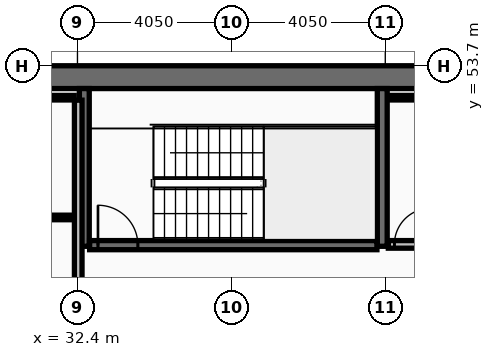
"""IFC4 building model, lengths in metres.
Left out: names, types, materials, properties, quantities, classifications, styles, units other than length and angle.
Written with IfcOpenShell. Run it as: python <this file> out.ifc"""

import sys

from ifc_helpers import new_model, si_unit, direction, frame, frame_2d, origin, place, context, subcontext, project, spatial, rectangle, extrude, element, fill, save


model = new_model("IFC4")
c1 = context("Model", 3, precision=1e-05, world=origin(), true_north=direction((0.0, 1.0)))
c2 = subcontext(c1, "Body", "Model", "MODEL_VIEW")
j1 = project(units=[si_unit("LENGTHUNIT", "METRE"), si_unit("PLANEANGLEUNIT", "RADIAN")], contexts=[c1])
p1 = place(None, origin())
s1 = spatial("IfcSite", under=j1, at=p1, CompositionType="ELEMENT")
p2 = place(p1, origin())
s2 = spatial("IfcBuilding", under=s1, at=p2, CompositionType="ELEMENT")
p3 = place(p2, frame((0.0, 0.0, 239.0)))
s3 = spatial("IfcBuildingStorey", under=s2, at=p3, CompositionType="ELEMENT", Elevation=239.0)
p4 = place(p3, frame((16.2, 53.4, 0.0), z_axis=(0.0, 0.0, 1.0), x_axis=(1.0, 0.0, 0.0)))
e1 = element("IfcWall", 1, at=p4, inside=s3, PredefinedType="SHEAR", context=c2, shape_type="SweptSolid", body=[
    extrude(rectangle(XDim=40.5, YDim=0.6, at=frame_2d((20.25, 0.0))), origin(), (0.0, 0.0, 1.0), 3.44),
])
for number, where, z_axis, x_axis in (
    (2, (32.58, 48.95, 0.0), (0.0, 0.0, 1.0), (0.0, 1.0, 0.0)),
    (3, (40.42, 48.95, 0.0), (0.0, 0.0, 1.0), (0.0, 1.0, 0.0)),
):
    element("IfcWall", number, at=place(p3, frame(where, z_axis=z_axis, x_axis=x_axis)), inside=s3, PredefinedType="SHEAR", context=c2, shape_type="SweptSolid", body=[
        extrude(rectangle(XDim=4.15, YDim=0.26, at=frame_2d((2.075, 0.0))), origin(), (0.0, 0.0, 1.0), 3.44),
    ])
p5 = place(p3, frame((32.72, 48.98, 0.0), z_axis=(0.0, 0.0, 1.0), x_axis=(1.0, 0.0, 0.0)))
e4 = element("IfcWall", 4, at=p5, inside=s3, PredefinedType="SHEAR", context=c2, shape_type="SweptSolid", body=[
    extrude(rectangle(XDim=7.56, YDim=0.24, at=frame_2d((3.78, 0.0))), origin(), (0.0, 0.0, 1.0), 3.44),
])
p6 = place(p5, frame((0.22, 0.0, 0.0)))
e5 = element("IfcOpeningElement", 5, at=p6, cuts=e4, PredefinedType="OPENING", context=c2, shape_type="SweptSolid", body=[
    extrude(rectangle(XDim=1.05, YDim=2.15, at=frame_2d((0.525, 1.075))), frame((0.0, 0.13, 0.0), z_axis=(0.0, -1.0, 0.0), x_axis=(1.0, 0.0, 0.0)), (0.0, 0.0, 1.0), 0.26),
])
p7 = place(p3, frame((32.42, 46.805, 0.0), z_axis=(0.0, 0.0, 1.0), x_axis=(0.0, 1.0, 0.0)))
e6 = element("IfcWall", 6, at=p7, inside=s3, PredefinedType="PARTITIONING", context=c2, shape_type="SweptSolid", body=[
    extrude(rectangle(XDim=5.99, YDim=0.2, at=frame_2d((2.995, 0.0))), origin(), (0.0, 0.0, 1.0), 3.44),
])
p8 = place(p3, frame((24.805, 52.86, 0.0), z_axis=(0.0, 0.0, 1.0), x_axis=(1.0, 0.0, 0.0)))
e7 = element("IfcWall", 7, at=p8, inside=s3, PredefinedType="PARTITIONING", context=c2, shape_type="SweptSolid", body=[
    extrude(rectangle(XDim=7.51, YDim=0.12, at=frame_2d((3.755, 0.0))), origin(), (0.0, 0.0, 1.0), 3.44),
])
p9 = place(p3, frame((24.805, 49.709, 0.0), z_axis=(0.0, 0.0, 1.0), x_axis=(1.0, 0.0, 0.0)))
e8 = element("IfcWall", 8, at=p9, inside=s3, PredefinedType="PARTITIONING", context=c2, shape_type="SweptSolid", body=[
    extrude(rectangle(XDim=7.51, YDim=0.12, at=frame_2d((3.755, 0.0))), origin(), (0.0, 0.0, 1.0), 3.44),
])
p10 = place(p9, frame((2.4, 0.0, 0.0)))
e9 = element("IfcOpeningElement", 9, at=p10, cuts=e8, PredefinedType="OPENING", context=c2, shape_type="SweptSolid", body=[
    extrude(rectangle(XDim=0.9, YDim=2.05, at=frame_2d((0.45, 1.025))), frame((0.0, 0.07, 0.0), z_axis=(0.0, -1.0, 0.0), x_axis=(1.0, 0.0, 0.0)), (0.0, 0.0, 1.0), 0.14),
])
p11 = place(p3, frame((40.58, 52.86, 0.0), z_axis=(0.0, 0.0, 1.0), x_axis=(1.0, 0.0, 0.0)))
e10 = element("IfcWall", 10, at=p11, inside=s3, PredefinedType="PARTITIONING", context=c2, shape_type="SweptSolid", body=[
    extrude(rectangle(XDim=7.56, YDim=0.12, at=frame_2d((3.78, 0.0))), origin(), (0.0, 0.0, 1.0), 3.44),
])
p12 = place(p3, frame((40.58, 49.0, 0.0), z_axis=(0.0, 0.0, 1.0), x_axis=(1.0, 0.0, 0.0)))
e11 = element("IfcWall", 11, at=p12, inside=s3, PredefinedType="PARTITIONING", context=c2, shape_type="SweptSolid", body=[
    extrude(rectangle(XDim=7.56, YDim=0.2, at=frame_2d((3.78, 0.0))), origin(), (0.0, 0.0, 1.0), 3.44),
])
p13 = place(p12, frame((0.16, 0.0, 0.0)))
e12 = element("IfcOpeningElement", 12, at=p13, cuts=e11, PredefinedType="OPENING", context=c2, shape_type="SweptSolid", body=[
    extrude(rectangle(XDim=0.95, YDim=2.1, at=frame_2d((0.475, 1.05))), frame((0.0, 0.11, 0.0), z_axis=(0.0, -1.0, 0.0), x_axis=(1.0, 0.0, 0.0)), (0.0, 0.0, 1.0), 0.22),
])
p14 = place(p6, origin())
e13 = element("IfcDoor", 13, at=p14, inside=s3, OperationType="SINGLE_SWING_LEFT", PredefinedType="DOOR", context=c2, shape_type="SweptSolid", body=[
    extrude(rectangle(XDim=1.05, YDim=2.15, at=frame_2d((0.525, 1.075))), frame((0.0, 0.025, 0.0), z_axis=(0.0, -1.0, 0.0), x_axis=(1.0, 0.0, 0.0)), (0.0, 0.0, 1.0), 0.05),
])
fill(e5, e13)
p15 = place(p13, origin())
e14 = element("IfcDoor", 14, at=p15, inside=s3, OperationType="SINGLE_SWING_RIGHT", PredefinedType="DOOR", context=c2, shape_type="SweptSolid", body=[
    extrude(rectangle(XDim=0.95, YDim=2.1, at=frame_2d((0.475, 1.05))), frame((0.0, 0.025, 0.0), z_axis=(0.0, -1.0, 0.0), x_axis=(1.0, 0.0, 0.0)), (0.0, 0.0, 1.0), 0.05),
])
fill(e12, e14)
save(model, sys.argv[1])
